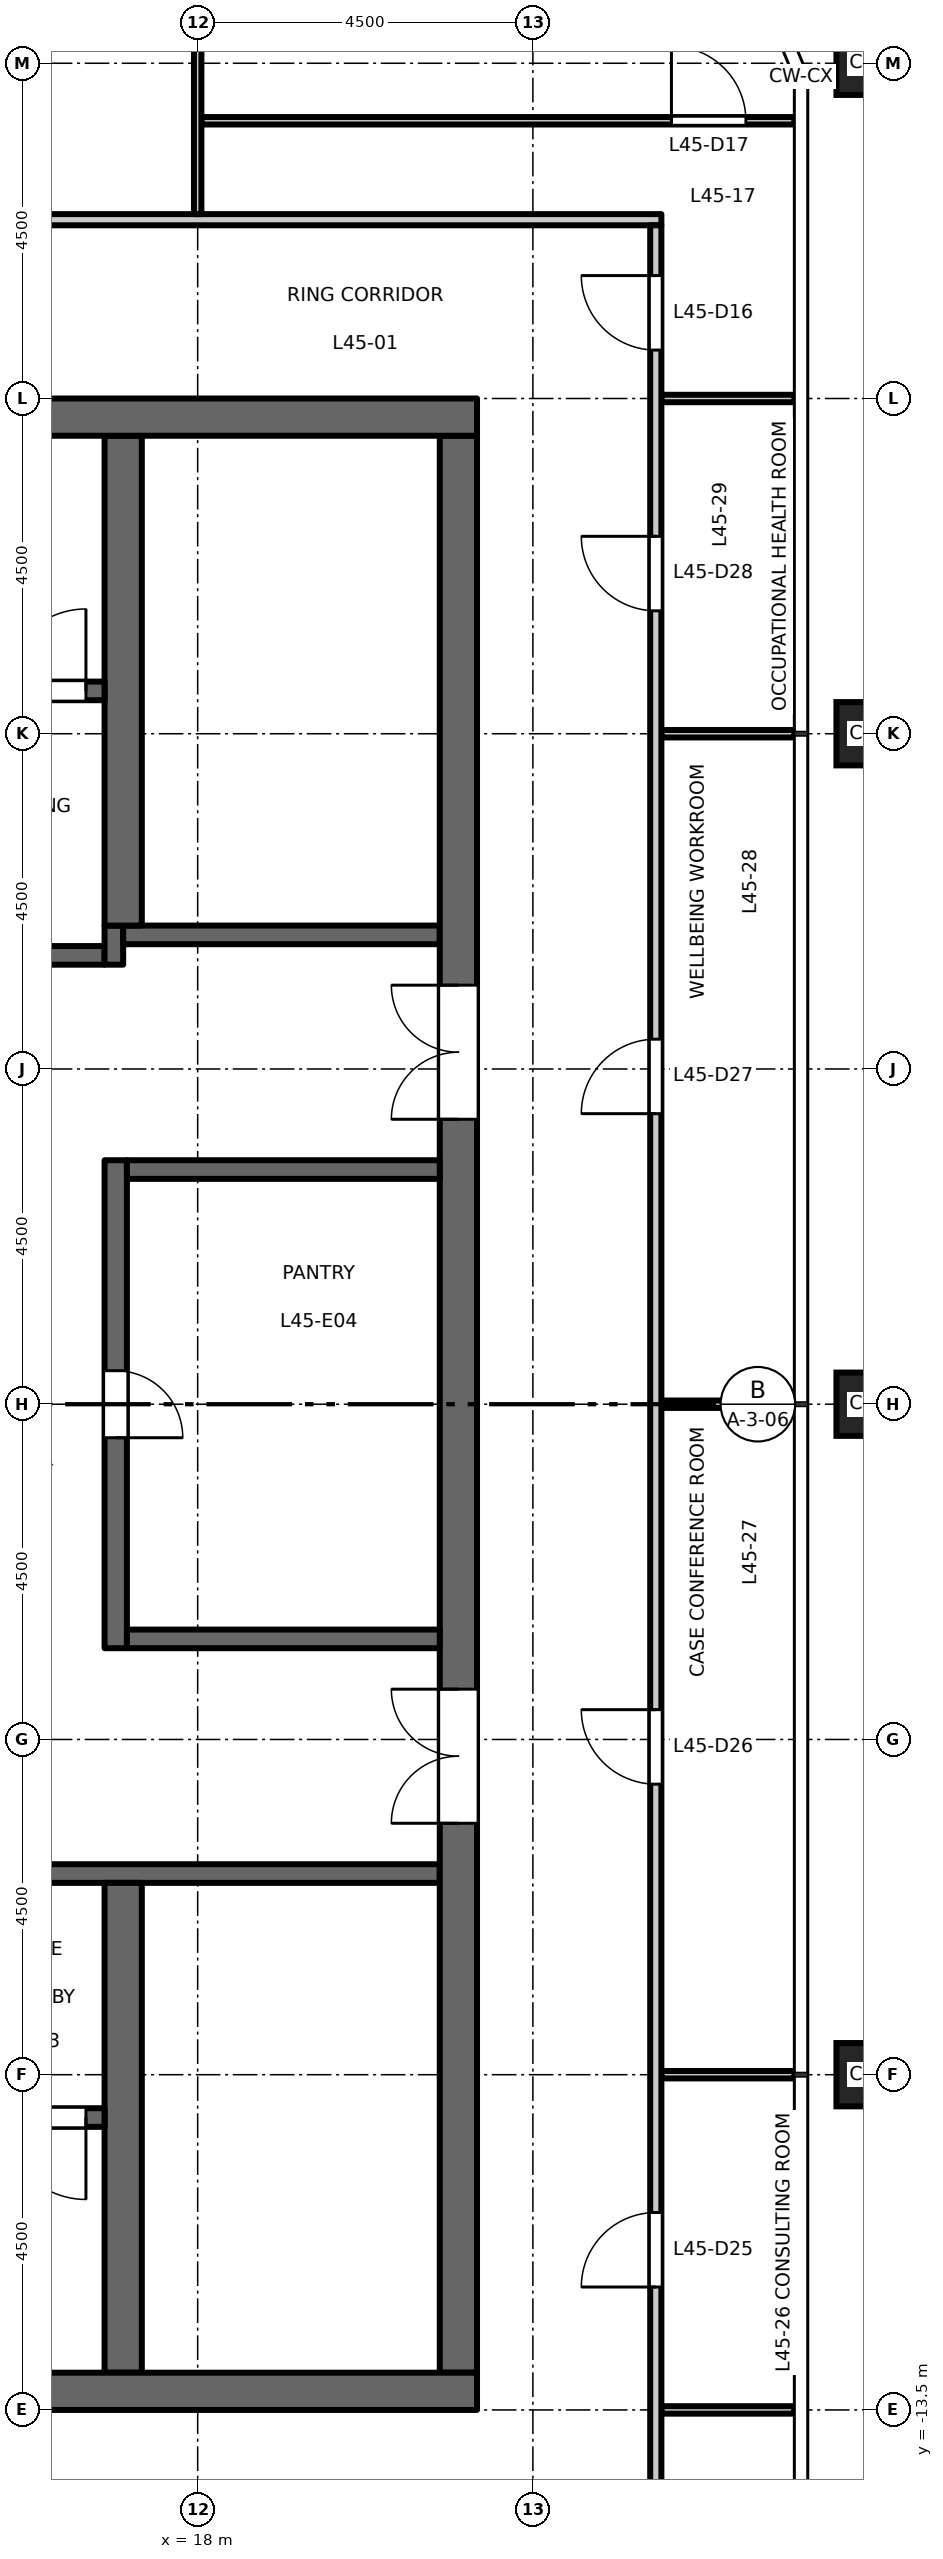
"""IFC4 building model, lengths in metres.
Left out: names, types, materials, properties, quantities, classifications, styles, units other than length and angle.
Written with IfcOpenShell. Run it as: python <this file> out.ifc"""

import sys

from ifc_helpers import new_model, si_unit, direction, frame, frame_2d, origin, origin_2d, place, context, subcontext, project, spatial, rectangle, hollow_rectangle, extrude, element, fill, save


model = new_model("IFC4")
c1 = context("Model", 3, precision=1e-05, world=origin(), true_north=direction((0.0, 1.0)))
c2 = subcontext(c1, "Body", "Model", "MODEL_VIEW")
j1 = project(units=[si_unit("LENGTHUNIT", "METRE"), si_unit("PLANEANGLEUNIT", "RADIAN")], contexts=[c1])
p1 = place(None, origin())
s1 = spatial("IfcSite", under=j1, at=p1, CompositionType="ELEMENT")
p2 = place(p1, origin())
s2 = spatial("IfcBuilding", under=s1, at=p2, CompositionType="ELEMENT")
p3 = place(p2, frame((0.0, 0.0, 210.7)))
s3 = spatial("IfcBuildingStorey", under=s2, at=p3, CompositionType="ELEMENT", Elevation=210.7)
for number, where, z_axis, x_axis in (
    (1, (27.0, -9.0, 0.0), (0.0, 0.0, 1.0), (1.0, 0.0, 0.0)),
    (2, (27.0, 0.0, 0.0), (0.0, 0.0, 1.0), (1.0, 0.0, 0.0)),
    (3, (27.0, 9.0, 0.0), (0.0, 0.0, 1.0), (1.0, 0.0, 0.0)),
    (4, (27.0, 18.0, 0.0), (0.0, 0.0, 1.0), (1.0, 0.0, 0.0)),
):
    element("IfcColumn", number, at=place(p3, frame(where, z_axis=z_axis, x_axis=x_axis)), inside=s3, PredefinedType="COLUMN", context=c2, shape_type="SweptSolid", body=[
        extrude(hollow_rectangle(XDim=0.85, YDim=0.85, WallThickness=0.05, at=origin_2d()), origin(), (0.0, 0.0, 1.0), 4.5),
    ])
p4 = place(p3, frame((12.15, 6.025, 0.0), z_axis=(0.0, 0.0, 1.0), x_axis=(1.0, 0.0, 0.0)))
e5 = element("IfcWall", 5, at=p4, inside=s3, PredefinedType="SHEAR", context=c2, shape_type="SweptSolid", body=[
    extrude(rectangle(XDim=4.6, YDim=0.25, at=frame_2d((2.3, 0.0))), origin(), (0.0, 0.0, 1.0), 4.35),
])
p5 = place(p4, frame((1.8, 0.0, 0.0)))
e6 = element("IfcOpeningElement", 6, at=p5, cuts=e5, PredefinedType="OPENING", context=c2, shape_type="SweptSolid", body=[
    extrude(rectangle(XDim=1.0, YDim=2.1, at=frame_2d((0.5, 1.05))), frame((0.0, 0.135, 0.0), z_axis=(0.0, -1.0, 0.0), x_axis=(1.0, 0.0, 0.0)), (0.0, 0.0, 1.0), 0.27),
])
p6 = place(p3, frame((16.875, 5.9, 0.0), z_axis=(0.0, 0.0, 1.0), x_axis=(0.0, 1.0, 0.0)))
e7 = element("IfcWall", 7, at=p6, inside=s3, PredefinedType="SHEAR", context=c2, shape_type="SweptSolid", body=[
    extrude(rectangle(XDim=0.525, YDim=0.25, at=frame_2d((0.263, 0.0))), origin(), (0.0, 0.0, 1.0), 4.35),
])
p7 = place(p3, frame((17.0, 6.3, 0.0), z_axis=(0.0, 0.0, 1.0), x_axis=(1.0, 0.0, 0.0)))
e8 = element("IfcWall", 8, at=p7, inside=s3, PredefinedType="SHEAR", context=c2, shape_type="SweptSolid", body=[
    extrude(rectangle(XDim=4.25, YDim=0.25, at=frame_2d((2.125, 0.0))), origin(), (0.0, 0.0, 1.0), 4.35),
])
p8 = place(p3, frame((12.15, -6.3, 0.0), z_axis=(0.0, 0.0, 1.0), x_axis=(1.0, 0.0, 0.0)))
e9 = element("IfcWall", 9, at=p8, inside=s3, PredefinedType="SHEAR", context=c2, shape_type="SweptSolid", body=[
    extrude(rectangle(XDim=9.1, YDim=0.25, at=frame_2d((4.55, 0.0))), origin(), (0.0, 0.0, 1.0), 4.35),
])
p9 = place(p8, frame((1.8, 0.0, 0.0)))
e10 = element("IfcOpeningElement", 10, at=p9, cuts=e9, PredefinedType="OPENING", context=c2, shape_type="SweptSolid", body=[
    extrude(rectangle(XDim=1.0, YDim=2.1, at=frame_2d((0.5, 1.05))), frame((0.0, 0.135, 0.0), z_axis=(0.0, -1.0, 0.0), x_axis=(1.0, 0.0, 0.0)), (0.0, 0.0, 1.0), 0.27),
])
p10 = place(p3, frame((21.5, -13.0, 0.0), z_axis=(0.0, 0.0, 1.0), x_axis=(0.0, 1.0, 0.0)))
e11 = element("IfcWall", 11, at=p10, inside=s3, PredefinedType="SHEAR", context=c2, shape_type="SweptSolid", body=[
    extrude(rectangle(XDim=26.0, YDim=0.5, at=frame_2d((13.0, 0.0))), origin(), (0.0, 0.0, 1.0), 4.35),
])
p11 = place(p10, frame((16.825, 0.0, 0.0)))
e12 = element("IfcOpeningElement", 12, at=p11, cuts=e11, PredefinedType="OPENING", context=c2, shape_type="SweptSolid", body=[
    extrude(rectangle(XDim=1.8, YDim=2.1, at=frame_2d((0.9, 1.05))), frame((0.0, 0.26, 0.0), z_axis=(0.0, -1.0, 0.0), x_axis=(1.0, 0.0, 0.0)), (0.0, 0.0, 1.0), 0.52),
])
p12 = place(p10, frame((7.375, 0.0, 0.0)))
e13 = element("IfcOpeningElement", 13, at=p12, cuts=e11, PredefinedType="OPENING", context=c2, shape_type="SweptSolid", body=[
    extrude(rectangle(XDim=1.8, YDim=2.1, at=frame_2d((0.9, 1.05))), frame((0.0, 0.26, 0.0), z_axis=(0.0, -1.0, 0.0), x_axis=(1.0, 0.0, 0.0)), (0.0, 0.0, 1.0), 0.52),
])
p13 = place(p3, frame((16.9, -3.275, 0.0), z_axis=(0.0, 0.0, 1.0), x_axis=(0.0, 1.0, 0.0)))
e14 = element("IfcWall", 14, at=p13, inside=s3, PredefinedType="SHEAR", context=c2, shape_type="SweptSolid", body=[
    extrude(rectangle(XDim=6.55, YDim=0.3, at=frame_2d((3.275, 0.0))), origin(), (0.0, 0.0, 1.0), 4.35),
])
p14 = place(p13, frame((2.825, 0.0, 0.0)))
e15 = element("IfcOpeningElement", 15, at=p14, cuts=e14, PredefinedType="OPENING", context=c2, shape_type="SweptSolid", body=[
    extrude(rectangle(XDim=0.9, YDim=2.1, at=frame_2d((0.45, 1.05))), frame((0.0, 0.16, 0.0), z_axis=(0.0, -1.0, 0.0), x_axis=(1.0, 0.0, 0.0)), (0.0, 0.0, 1.0), 0.32),
])
for number, where, z_axis, x_axis in (
    (16, (17.05, 3.15, 0.0), (0.0, 0.0, 1.0), (1.0, 0.0, 0.0)),
    (17, (17.05, -3.15, 0.0), (0.0, 0.0, 1.0), (1.0, 0.0, 0.0)),
):
    element("IfcWall", number, at=place(p3, frame(where, z_axis=z_axis, x_axis=x_axis)), inside=s3, PredefinedType="SHEAR", context=c2, shape_type="SweptSolid", body=[
        extrude(rectangle(XDim=4.2, YDim=0.25, at=frame_2d((2.1, 0.0))), origin(), (0.0, 0.0, 1.0), 4.35),
    ])
for number, where, z_axis, x_axis in (
    (18, (17.0, 6.425, 0.0), (0.0, 0.0, 1.0), (0.0, 1.0, 0.0)),
    (19, (17.0, -13.0, 0.0), (0.0, 0.0, 1.0), (0.0, 1.0, 0.0)),
):
    element("IfcWall", number, at=place(p3, frame(where, z_axis=z_axis, x_axis=x_axis)), inside=s3, PredefinedType="SHEAR", context=c2, shape_type="SweptSolid", body=[
        extrude(rectangle(XDim=6.575, YDim=0.5, at=frame_2d((3.288, 0.0))), origin(), (0.0, 0.0, 1.0), 4.35),
    ])
p15 = place(p3, frame((8.75, 9.575, 0.0), z_axis=(0.0, 0.0, 1.0), x_axis=(1.0, 0.0, 0.0)))
e20 = element("IfcWall", 20, at=p15, inside=s3, PredefinedType="SHEAR", context=c2, shape_type="SweptSolid", body=[
    extrude(rectangle(XDim=8.0, YDim=0.25, at=frame_2d((4.0, 0.0))), origin(), (0.0, 0.0, 1.0), 4.35),
])
p16 = place(p15, frame((6.65, 0.0, 0.0)))
e21 = element("IfcOpeningElement", 21, at=p16, cuts=e20, PredefinedType="OPENING", context=c2, shape_type="SweptSolid", body=[
    extrude(rectangle(XDim=1.1, YDim=2.1, at=frame_2d((0.55, 1.05))), frame((0.0, 0.135, 0.0), z_axis=(0.0, -1.0, 0.0), x_axis=(1.0, 0.0, 0.0)), (0.0, 0.0, 1.0), 0.27),
])
p17 = place(p3, frame((8.75, -9.575, 0.0), z_axis=(0.0, 0.0, 1.0), x_axis=(1.0, 0.0, 0.0)))
e22 = element("IfcWall", 22, at=p17, inside=s3, PredefinedType="SHEAR", context=c2, shape_type="SweptSolid", body=[
    extrude(rectangle(XDim=8.0, YDim=0.25, at=frame_2d((4.0, 0.0))), origin(), (0.0, 0.0, 1.0), 4.35),
])
p18 = place(p17, frame((6.65, 0.0, 0.0)))
e23 = element("IfcOpeningElement", 23, at=p18, cuts=e22, PredefinedType="OPENING", context=c2, shape_type="SweptSolid", body=[
    extrude(rectangle(XDim=1.1, YDim=2.1, at=frame_2d((0.55, 1.05))), frame((0.0, 0.135, 0.0), z_axis=(0.0, -1.0, 0.0), x_axis=(1.0, 0.0, 0.0)), (0.0, 0.0, 1.0), 0.27),
])
for number, where, z_axis, x_axis in (
    (24, (8.25, 13.25, 0.0), (0.0, 0.0, 1.0), (1.0, 0.0, 0.0)),
    (25, (8.25, -13.25, 0.0), (0.0, 0.0, 1.0), (1.0, 0.0, 0.0)),
):
    element("IfcWall", number, at=place(p3, frame(where, z_axis=z_axis, x_axis=x_axis)), inside=s3, PredefinedType="SHEAR", context=c2, shape_type="SweptSolid", body=[
        extrude(rectangle(XDim=13.5, YDim=0.5, at=frame_2d((6.75, 0.0))), origin(), (0.0, 0.0, 1.0), 4.35),
    ])
p19 = place(p3, frame((24.225, -13.5, 0.0), z_axis=(0.0, 0.0, 1.0), x_axis=(1.0, 0.0, 0.0)))
e26 = element("IfcWall", 26, at=p19, inside=s3, PredefinedType="PARTITIONING", context=c2, shape_type="SweptSolid", body=[
    extrude(rectangle(XDim=1.785, YDim=0.1, at=frame_2d((0.893, 0.0))), origin(), (0.0, 0.0, 1.0), 3.95),
])
for number, where, z_axis, x_axis in (
    (27, (24.225, -9.0, 0.0), (0.0, 0.0, 1.0), (1.0, 0.0, 0.0)),
    (28, (24.225, 0.0, 0.0), (0.0, 0.0, 1.0), (1.0, 0.0, 0.0)),
    (29, (24.225, 9.0, 0.0), (0.0, 0.0, 1.0), (1.0, 0.0, 0.0)),
    (30, (24.225, 13.5, 0.0), (0.0, 0.0, 1.0), (1.0, 0.0, 0.0)),
):
    element("IfcWall", number, at=place(p3, frame(where, z_axis=z_axis, x_axis=x_axis)), inside=s3, PredefinedType="PARTITIONING", context=c2, shape_type="SweptSolid", body=[
        extrude(rectangle(XDim=1.785, YDim=0.1, at=frame_2d((0.893, 0.0))), origin(), (0.0, 0.0, 1.0), 4.35),
    ])
p20 = place(p3, frame((-24.225, 15.9, 0.0), z_axis=(0.0, 0.0, 1.0), x_axis=(1.0, 0.0, 0.0)))
e31 = element("IfcWall", 31, at=p20, inside=s3, PredefinedType="PARTITIONING", context=c2, shape_type="SweptSolid", body=[
    extrude(rectangle(XDim=48.45, YDim=0.15, at=frame_2d((24.225, 0.0))), origin(), (0.0, 0.0, 1.0), 4.35),
])
p21 = place(p20, frame((10.325, 0.0, 0.0)))
e32 = element("IfcOpeningElement", 32, at=p21, cuts=e31, PredefinedType="OPENING", context=c2, shape_type="SweptSolid", body=[
    extrude(rectangle(XDim=1.0, YDim=2.1, at=frame_2d((0.5, 1.05))), frame((0.0, 0.085, 0.0), z_axis=(0.0, -1.0, 0.0), x_axis=(1.0, 0.0, 0.0)), (0.0, 0.0, 1.0), 0.17),
])
p22 = place(p20, frame((19.325, 0.0, 0.0)))
e33 = element("IfcOpeningElement", 33, at=p22, cuts=e31, PredefinedType="OPENING", context=c2, shape_type="SweptSolid", body=[
    extrude(rectangle(XDim=1.0, YDim=2.1, at=frame_2d((0.5, 1.05))), frame((0.0, 0.085, 0.0), z_axis=(0.0, -1.0, 0.0), x_axis=(1.0, 0.0, 0.0)), (0.0, 0.0, 1.0), 0.17),
])
p23 = place(p20, frame((28.325, 0.0, 0.0)))
e34 = element("IfcOpeningElement", 34, at=p23, cuts=e31, PredefinedType="OPENING", context=c2, shape_type="SweptSolid", body=[
    extrude(rectangle(XDim=1.0, YDim=2.1, at=frame_2d((0.5, 1.05))), frame((0.0, 0.085, 0.0), z_axis=(0.0, -1.0, 0.0), x_axis=(1.0, 0.0, 0.0)), (0.0, 0.0, 1.0), 0.17),
])
p24 = place(p20, frame((37.325, 0.0, 0.0)))
e35 = element("IfcOpeningElement", 35, at=p24, cuts=e31, PredefinedType="OPENING", context=c2, shape_type="SweptSolid", body=[
    extrude(rectangle(XDim=1.0, YDim=2.1, at=frame_2d((0.5, 1.05))), frame((0.0, 0.085, 0.0), z_axis=(0.0, -1.0, 0.0), x_axis=(1.0, 0.0, 0.0)), (0.0, 0.0, 1.0), 0.17),
])
p25 = place(p20, frame((2.575, 0.0, 0.0)))
e36 = element("IfcOpeningElement", 36, at=p25, cuts=e31, PredefinedType="OPENING", context=c2, shape_type="SweptSolid", body=[
    extrude(rectangle(XDim=1.0, YDim=2.1, at=frame_2d((0.5, 1.05))), frame((0.0, 0.085, 0.0), z_axis=(0.0, -1.0, 0.0), x_axis=(1.0, 0.0, 0.0)), (0.0, 0.0, 1.0), 0.17),
])
p26 = place(p3, frame((18.05, 17.228, 0.0), z_axis=(0.0, 0.0, 1.0), x_axis=(1.0, 0.0, 0.0)))
e37 = element("IfcWall", 37, at=p26, inside=s3, PredefinedType="PARTITIONING", context=c2, shape_type="SweptSolid", body=[
    extrude(rectangle(XDim=7.96, YDim=0.1, at=frame_2d((3.98, 0.0))), origin(), (0.0, 0.0, 1.0), 4.35),
])
p27 = place(p26, frame((6.31, 0.0, 0.0)))
e38 = element("IfcOpeningElement", 38, at=p27, cuts=e37, PredefinedType="OPENING", context=c2, shape_type="SweptSolid", body=[
    extrude(rectangle(XDim=1.0, YDim=2.1, at=frame_2d((0.5, 1.05))), frame((0.0, 0.06, 0.0), z_axis=(0.0, -1.0, 0.0), x_axis=(1.0, 0.0, 0.0)), (0.0, 0.0, 1.0), 0.12),
])
p28 = place(p3, frame((18.0, 15.975, 0.0), z_axis=(0.0, 0.0, 1.0), x_axis=(0.0, 1.0, 0.0)))
e39 = element("IfcWall", 39, at=p28, inside=s3, PredefinedType="PARTITIONING", context=c2, shape_type="SweptSolid", body=[
    extrude(rectangle(XDim=9.953, YDim=0.1, at=frame_2d((4.977, 0.0))), origin(), (0.0, 0.0, 1.0), 3.65),
])
p29 = place(p3, frame((24.15, -15.825, 0.0), z_axis=(0.0, 0.0, 1.0), x_axis=(0.0, 1.0, 0.0)))
e40 = element("IfcWall", 40, at=p29, inside=s3, PredefinedType="PARTITIONING", context=c2, shape_type="SweptSolid", body=[
    extrude(rectangle(XDim=31.65, YDim=0.15, at=frame_2d((15.825, 0.0))), origin(), (0.0, 0.0, 1.0), 4.35),
])
p30 = place(p29, frame((29.975, 0.0, 0.0)))
e41 = element("IfcOpeningElement", 41, at=p30, cuts=e40, PredefinedType="OPENING", context=c2, shape_type="SweptSolid", body=[
    extrude(rectangle(XDim=1.0, YDim=2.1, at=frame_2d((0.5, 1.05))), frame((0.0, 0.085, 0.0), z_axis=(0.0, -1.0, 0.0), x_axis=(1.0, 0.0, 0.0)), (0.0, 0.0, 1.0), 0.17),
])
p31 = place(p29, frame((3.975, 0.0, 0.0)))
e42 = element("IfcOpeningElement", 42, at=p31, cuts=e40, PredefinedType="OPENING", context=c2, shape_type="SweptSolid", body=[
    extrude(rectangle(XDim=1.0, YDim=2.1, at=frame_2d((0.5, 1.05))), frame((0.0, 0.085, 0.0), z_axis=(0.0, -1.0, 0.0), x_axis=(1.0, 0.0, 0.0)), (0.0, 0.0, 1.0), 0.17),
])
p32 = place(p29, frame((10.725, 0.0, 0.0)))
e43 = element("IfcOpeningElement", 43, at=p32, cuts=e40, PredefinedType="OPENING", context=c2, shape_type="SweptSolid", body=[
    extrude(rectangle(XDim=1.0, YDim=2.1, at=frame_2d((0.5, 1.05))), frame((0.0, 0.085, 0.0), z_axis=(0.0, -1.0, 0.0), x_axis=(1.0, 0.0, 0.0)), (0.0, 0.0, 1.0), 0.17),
])
p33 = place(p29, frame((19.725, 0.0, 0.0)))
e44 = element("IfcOpeningElement", 44, at=p33, cuts=e40, PredefinedType="OPENING", context=c2, shape_type="SweptSolid", body=[
    extrude(rectangle(XDim=1.0, YDim=2.1, at=frame_2d((0.5, 1.05))), frame((0.0, 0.085, 0.0), z_axis=(0.0, -1.0, 0.0), x_axis=(1.0, 0.0, 0.0)), (0.0, 0.0, 1.0), 0.17),
])
p34 = place(p29, frame((26.475, 0.0, 0.0)))
e45 = element("IfcOpeningElement", 45, at=p34, cuts=e40, PredefinedType="OPENING", context=c2, shape_type="SweptSolid", body=[
    extrude(rectangle(XDim=1.0, YDim=2.1, at=frame_2d((0.5, 1.05))), frame((0.0, 0.085, 0.0), z_axis=(0.0, -1.0, 0.0), x_axis=(1.0, 0.0, 0.0)), (0.0, 0.0, 1.0), 0.17),
])
p35 = place(p16, origin())
e46 = element("IfcDoor", 46, at=p35, inside=s3, OperationType="SINGLE_SWING_LEFT", PredefinedType="DOOR", context=c2, shape_type="SweptSolid", body=[
    extrude(rectangle(XDim=1.1, YDim=2.1, at=frame_2d((0.55, 1.05))), frame((0.0, 0.025, 0.0), z_axis=(0.0, -1.0, 0.0), x_axis=(1.0, 0.0, 0.0)), (0.0, 0.0, 1.0), 0.05),
])
fill(e21, e46)
p36 = place(p18, origin())
e47 = element("IfcDoor", 47, at=p36, inside=s3, OperationType="SINGLE_SWING_RIGHT", PredefinedType="DOOR", context=c2, shape_type="SweptSolid", body=[
    extrude(rectangle(XDim=1.1, YDim=2.1, at=frame_2d((0.55, 1.05))), frame((0.0, 0.025, 0.0), z_axis=(0.0, -1.0, 0.0), x_axis=(1.0, 0.0, 0.0)), (0.0, 0.0, 1.0), 0.05),
])
fill(e23, e47)
p37 = place(p11, origin())
e48 = element("IfcDoor", 48, at=p37, inside=s3, OperationType="DOUBLE_DOOR_DOUBLE_SWING", PredefinedType="DOOR", context=c2, shape_type="SweptSolid", body=[
    extrude(rectangle(XDim=1.8, YDim=2.1, at=frame_2d((0.9, 1.05))), frame((0.0, 0.025, 0.0), z_axis=(0.0, -1.0, 0.0), x_axis=(1.0, 0.0, 0.0)), (0.0, 0.0, 1.0), 0.05),
])
fill(e12, e48)
p38 = place(p12, origin())
e49 = element("IfcDoor", 49, at=p38, inside=s3, OperationType="DOUBLE_DOOR_DOUBLE_SWING", PredefinedType="DOOR", context=c2, shape_type="SweptSolid", body=[
    extrude(rectangle(XDim=1.8, YDim=2.1, at=frame_2d((0.9, 1.05))), frame((0.0, 0.025, 0.0), z_axis=(0.0, -1.0, 0.0), x_axis=(1.0, 0.0, 0.0)), (0.0, 0.0, 1.0), 0.05),
])
fill(e13, e49)
p39 = place(p14, origin())
e50 = element("IfcDoor", 50, at=p39, inside=s3, OperationType="SINGLE_SWING_LEFT", PredefinedType="DOOR", context=c2, shape_type="SweptSolid", body=[
    extrude(rectangle(XDim=0.9, YDim=2.1, at=frame_2d((0.45, 1.05))), frame((0.0, 0.025, 0.0), z_axis=(0.0, -1.0, 0.0), x_axis=(1.0, 0.0, 0.0)), (0.0, 0.0, 1.0), 0.05),
])
fill(e15, e50)
p40 = place(p30, origin())
e51 = element("IfcDoor", 51, at=p40, inside=s3, OperationType="SINGLE_SWING_RIGHT", PredefinedType="DOOR", context=c2, shape_type="SweptSolid", body=[
    extrude(rectangle(XDim=1.0, YDim=2.1, at=frame_2d((0.5, 1.05))), frame((0.0, 0.025, 0.0), z_axis=(0.0, -1.0, 0.0), x_axis=(1.0, 0.0, 0.0)), (0.0, 0.0, 1.0), 0.05),
])
fill(e41, e51)
p41 = place(p27, origin())
e52 = element("IfcDoor", 52, at=p41, inside=s3, OperationType="SINGLE_SWING_LEFT", PredefinedType="DOOR", context=c2, shape_type="SweptSolid", body=[
    extrude(rectangle(XDim=1.0, YDim=2.1, at=frame_2d((0.5, 1.05))), frame((0.0, 0.025, 0.0), z_axis=(0.0, -1.0, 0.0), x_axis=(1.0, 0.0, 0.0)), (0.0, 0.0, 1.0), 0.05),
])
fill(e38, e52)
p42 = place(p31, origin())
e53 = element("IfcDoor", 53, at=p42, inside=s3, OperationType="SINGLE_SWING_LEFT", PredefinedType="DOOR", context=c2, shape_type="SweptSolid", body=[
    extrude(rectangle(XDim=1.0, YDim=2.1, at=frame_2d((0.5, 1.05))), frame((0.0, 0.025, 0.0), z_axis=(0.0, -1.0, 0.0), x_axis=(1.0, 0.0, 0.0)), (0.0, 0.0, 1.0), 0.05),
])
fill(e42, e53)
p43 = place(p32, origin())
e54 = element("IfcDoor", 54, at=p43, inside=s3, OperationType="SINGLE_SWING_RIGHT", PredefinedType="DOOR", context=c2, shape_type="SweptSolid", body=[
    extrude(rectangle(XDim=1.0, YDim=2.1, at=frame_2d((0.5, 1.05))), frame((0.0, 0.025, 0.0), z_axis=(0.0, -1.0, 0.0), x_axis=(1.0, 0.0, 0.0)), (0.0, 0.0, 1.0), 0.05),
])
fill(e43, e54)
p44 = place(p33, origin())
e55 = element("IfcDoor", 55, at=p44, inside=s3, OperationType="SINGLE_SWING_LEFT", PredefinedType="DOOR", context=c2, shape_type="SweptSolid", body=[
    extrude(rectangle(XDim=1.0, YDim=2.1, at=frame_2d((0.5, 1.05))), frame((0.0, 0.025, 0.0), z_axis=(0.0, -1.0, 0.0), x_axis=(1.0, 0.0, 0.0)), (0.0, 0.0, 1.0), 0.05),
])
fill(e44, e55)
p45 = place(p34, origin())
e56 = element("IfcDoor", 56, at=p45, inside=s3, OperationType="SINGLE_SWING_RIGHT", PredefinedType="DOOR", context=c2, shape_type="SweptSolid", body=[
    extrude(rectangle(XDim=1.0, YDim=2.1, at=frame_2d((0.5, 1.05))), frame((0.0, 0.025, 0.0), z_axis=(0.0, -1.0, 0.0), x_axis=(1.0, 0.0, 0.0)), (0.0, 0.0, 1.0), 0.05),
])
fill(e45, e56)
save(model, sys.argv[1])
